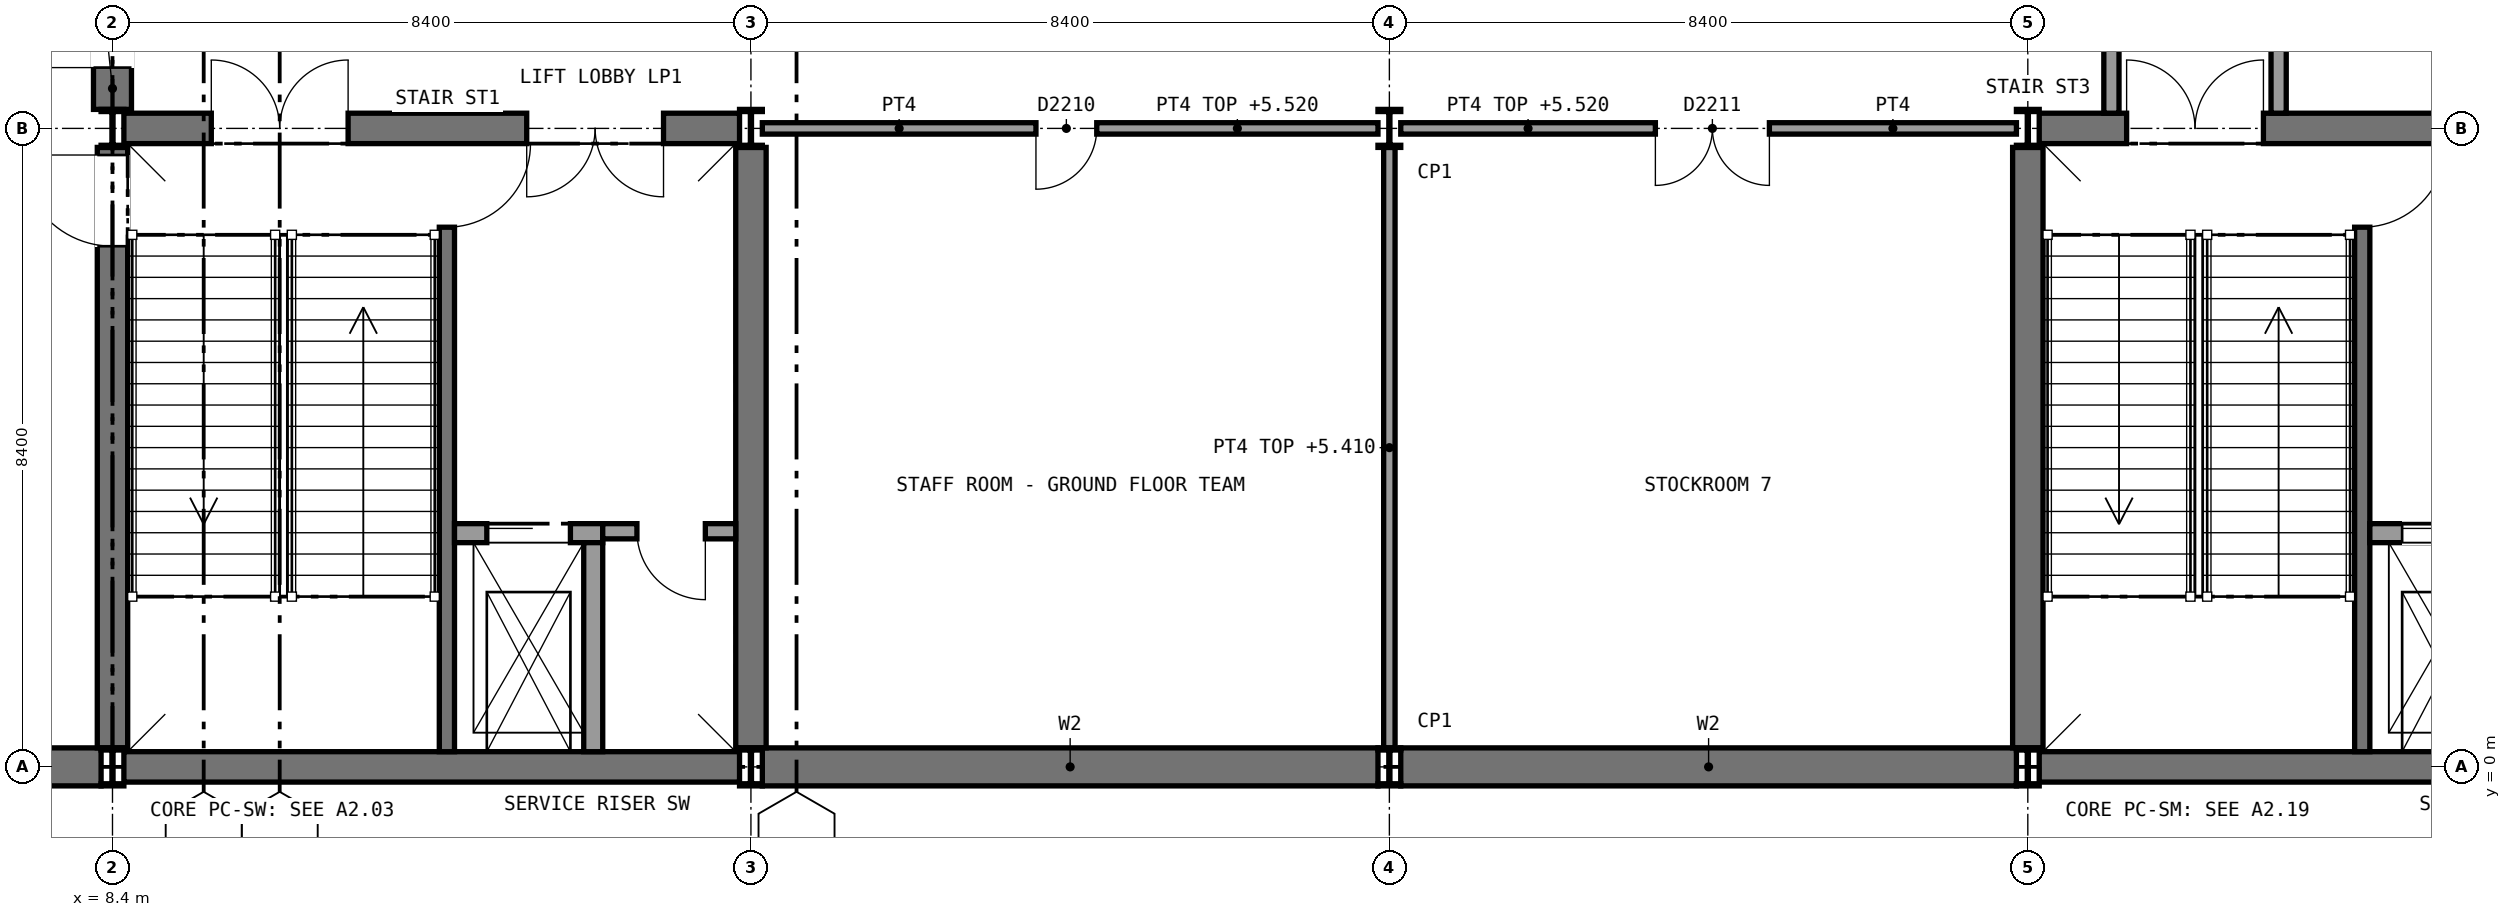
"""IFC4 building model, lengths in metres.
Left out: names, types, materials, properties, quantities, classifications, styles, units other than length and angle.
Written with IfcOpenShell. Run it as: python <this file> out.ifc"""

import sys

from ifc_helpers import new_model, si_unit, direction, frame, frame_2d, origin, origin_2d, place, context, subcontext, project, spatial, rectangle, i_section, extrude, element, fill, save


model = new_model("IFC4")
c1 = context("Model", 3, precision=1e-05, world=origin(), true_north=direction((0.0, 1.0)))
c2 = subcontext(c1, "Body", "Model", "MODEL_VIEW")
j1 = project(units=[si_unit("LENGTHUNIT", "METRE"), si_unit("PLANEANGLEUNIT", "RADIAN")], contexts=[c1])
p1 = place(None, origin())
s1 = spatial("IfcSite", under=j1, at=p1, CompositionType="ELEMENT")
p2 = place(p1, origin())
s2 = spatial("IfcBuilding", under=s1, at=p2, CompositionType="ELEMENT")
p3 = place(p2, origin())
s3 = spatial("IfcBuildingStorey", under=s2, at=p3, CompositionType="ELEMENT", Elevation=0.0)
p4 = place(p3, frame((0.305, 0.0, 0.0), z_axis=(0.0, 0.0, 1.0), x_axis=(1.0, 0.0, 0.0)))
e1 = element("IfcWall", 1, at=p4, inside=s3, PredefinedType="SHEAR", context=c2, shape_type="SweptSolid", body=[
    extrude(rectangle(XDim=7.945, YDim=0.5, at=frame_2d((3.973, 0.0))), origin(), (0.0, 0.0, 1.0), 6.0),
])
p5 = place(p3, frame((16.95, 0.0, 0.0), z_axis=(0.0, 0.0, 1.0), x_axis=(1.0, 0.0, 0.0)))
e2 = element("IfcWall", 2, at=p5, inside=s3, PredefinedType="SHEAR", context=c2, shape_type="SweptSolid", body=[
    extrude(rectangle(XDim=8.1, YDim=0.5, at=frame_2d((4.05, 0.0))), origin(), (0.0, 0.0, 1.0), 5.85),
])
p6 = place(p3, frame((25.35, 0.0, 0.0), z_axis=(0.0, 0.0, 1.0), x_axis=(1.0, 0.0, 0.0)))
e3 = element("IfcWall", 3, at=p6, inside=s3, PredefinedType="SHEAR", context=c2, shape_type="SweptSolid", body=[
    extrude(rectangle(XDim=8.1, YDim=0.5, at=frame_2d((4.05, 0.0))), origin(), (0.0, 0.0, 1.0), 5.85),
])
p7 = place(p3, frame((8.55, 0.0, 0.0), z_axis=(0.0, 0.0, 1.0), x_axis=(1.0, 0.0, 0.0)))
e4 = element("IfcWall", 4, at=p7, inside=s3, PredefinedType="SHEAR", context=c2, shape_type="SweptSolid", body=[
    extrude(rectangle(XDim=8.1, YDim=0.4, at=frame_2d((4.05, 0.0))), origin(), (0.0, 0.0, 1.0), 5.85),
])
p8 = place(p3, frame((8.55, 8.4, 0.0), z_axis=(0.0, 0.0, 1.0), x_axis=(1.0, 0.0, 0.0)))
e5 = element("IfcWall", 5, at=p8, inside=s3, PredefinedType="SHEAR", context=c2, shape_type="SweptSolid", body=[
    extrude(rectangle(XDim=8.1, YDim=0.4, at=frame_2d((4.05, 0.0))), origin(), (0.0, 0.0, 1.0), 5.85),
])
p9 = place(p8, frame((1.15, 0.0, 0.0)))
e6 = element("IfcOpeningElement", 6, at=p9, cuts=e5, PredefinedType="OPENING", context=c2, shape_type="SweptSolid", body=[
    extrude(rectangle(XDim=1.8, YDim=2.1, at=frame_2d((0.9, 1.05))), frame((0.0, 0.21, 0.0), z_axis=(0.0, -1.0, 0.0), x_axis=(1.0, 0.0, 0.0)), (0.0, 0.0, 1.0), 0.42),
])
p10 = place(p8, frame((5.3, 0.0, 0.0)))
e7 = element("IfcOpeningElement", 7, at=p10, cuts=e5, PredefinedType="OPENING", context=c2, shape_type="SweptSolid", body=[
    extrude(rectangle(XDim=1.8, YDim=2.1, at=frame_2d((0.9, 1.05))), frame((0.0, 0.21, 0.0), z_axis=(0.0, -1.0, 0.0), x_axis=(1.0, 0.0, 0.0)), (0.0, 0.0, 1.0), 0.42),
])
p11 = place(p3, frame((8.4, 0.25, 0.0), z_axis=(0.0, 0.0, 1.0), x_axis=(0.0, 1.0, 0.0)))
e8 = element("IfcWall", 8, at=p11, inside=s3, PredefinedType="SHEAR", context=c2, shape_type="SweptSolid", body=[
    extrude(rectangle(XDim=7.9, YDim=0.4, at=frame_2d((3.95, 0.0))), origin(), (0.0, 0.0, 1.0), 5.85),
])
p12 = place(p11, frame((6.6, 0.0, 0.0)))
e9 = element("IfcOpeningElement", 9, at=p12, cuts=e8, PredefinedType="OPENING", context=c2, shape_type="SweptSolid", body=[
    extrude(rectangle(XDim=1.2, YDim=2.1, at=frame_2d((0.6, 1.05))), frame((0.0, 0.21, 0.0), z_axis=(0.0, -1.0, 0.0), x_axis=(1.0, 0.0, 0.0)), (0.0, 0.0, 1.0), 0.42),
])
p13 = place(p3, frame((16.8, 0.25, 0.0), z_axis=(0.0, 0.0, 1.0), x_axis=(0.0, 1.0, 0.0)))
e10 = element("IfcWall", 10, at=p13, inside=s3, PredefinedType="SHEAR", context=c2, shape_type="SweptSolid", body=[
    extrude(rectangle(XDim=7.9, YDim=0.4, at=frame_2d((3.95, 0.0))), origin(), (0.0, 0.0, 1.0), 5.85),
])
p14 = place(p3, frame((33.75, 0.0, 0.0), z_axis=(0.0, 0.0, 1.0), x_axis=(1.0, 0.0, 0.0)))
e11 = element("IfcWall", 11, at=p14, inside=s3, PredefinedType="SHEAR", context=c2, shape_type="SweptSolid", body=[
    extrude(rectangle(XDim=8.1, YDim=0.4, at=frame_2d((4.05, 0.0))), origin(), (0.0, 0.0, 1.0), 5.85),
])
p15 = place(p3, frame((33.75, 8.4, 0.0), z_axis=(0.0, 0.0, 1.0), x_axis=(1.0, 0.0, 0.0)))
e12 = element("IfcWall", 12, at=p15, inside=s3, PredefinedType="SHEAR", context=c2, shape_type="SweptSolid", body=[
    extrude(rectangle(XDim=8.1, YDim=0.4, at=frame_2d((4.05, 0.0))), origin(), (0.0, 0.0, 1.0), 5.85),
])
p16 = place(p15, frame((5.3, 0.0, 0.0)))
e13 = element("IfcOpeningElement", 13, at=p16, cuts=e12, PredefinedType="OPENING", context=c2, shape_type="SweptSolid", body=[
    extrude(rectangle(XDim=1.8, YDim=2.1, at=frame_2d((0.9, 1.05))), frame((0.0, 0.21, 0.0), z_axis=(0.0, -1.0, 0.0), x_axis=(1.0, 0.0, 0.0)), (0.0, 0.0, 1.0), 0.42),
])
p17 = place(p15, frame((1.15, 0.0, 0.0)))
e14 = element("IfcOpeningElement", 14, at=p17, cuts=e12, PredefinedType="OPENING", context=c2, shape_type="SweptSolid", body=[
    extrude(rectangle(XDim=1.8, YDim=2.1, at=frame_2d((0.9, 1.05))), frame((0.0, 0.21, 0.0), z_axis=(0.0, -1.0, 0.0), x_axis=(1.0, 0.0, 0.0)), (0.0, 0.0, 1.0), 0.42),
])
p18 = place(p3, frame((33.6, 0.25, 0.0), z_axis=(0.0, 0.0, 1.0), x_axis=(0.0, 1.0, 0.0)))
e15 = element("IfcWall", 15, at=p18, inside=s3, PredefinedType="SHEAR", context=c2, shape_type="SweptSolid", body=[
    extrude(rectangle(XDim=7.9, YDim=0.4, at=frame_2d((3.95, 0.0))), origin(), (0.0, 0.0, 1.0), 5.85),
])
for number, where, z_axis, x_axis in (
    (16, (8.4, 0.0, 0.0), (0.0, 0.0, 1.0), (1.0, 0.0, 0.0)),
    (17, (8.4, 8.4, 0.0), (0.0, 0.0, 1.0), (1.0, 0.0, 0.0)),
    (18, (16.8, 0.0, 0.0), (0.0, 0.0, 1.0), (1.0, 0.0, 0.0)),
    (19, (16.8, 8.4, 0.0), (0.0, 0.0, 1.0), (1.0, 0.0, 0.0)),
    (20, (25.2, 0.0, 0.0), (0.0, 0.0, 1.0), (1.0, 0.0, 0.0)),
    (21, (25.2, 8.4, 0.0), (0.0, 0.0, 1.0), (1.0, 0.0, 0.0)),
    (22, (33.6, 0.0, 0.0), (0.0, 0.0, 1.0), (1.0, 0.0, 0.0)),
    (23, (33.6, 8.4, 0.0), (0.0, 0.0, 1.0), (1.0, 0.0, 0.0)),
):
    element("IfcColumn", number, at=place(p3, frame(where, z_axis=z_axis, x_axis=x_axis)), inside=s3, PredefinedType="COLUMN", context=c2, shape_type="SweptSolid", body=[
        extrude(i_section(OverallWidth=0.3, OverallDepth=0.5, WebThickness=0.014, FlangeThickness=0.028, FilletRadius=0.027, at=origin_2d()), origin(), (0.0, 0.0, 1.0), 6.0),
    ])
p19 = place(p3, frame((25.2, 0.25, 0.0), z_axis=(0.0, 0.0, 1.0), x_axis=(0.0, 1.0, 0.0)))
e24 = element("IfcWall", 24, at=p19, inside=s3, PredefinedType="SOLIDWALL", context=c2, shape_type="SweptSolid", body=[
    extrude(rectangle(XDim=7.9, YDim=0.15, at=frame_2d((3.95, 0.0))), origin(), (0.0, 0.0, 1.0), 5.41),
])
p20 = place(p3, frame((16.95, 8.4, 0.0), z_axis=(0.0, 0.0, 1.0), x_axis=(1.0, 0.0, 0.0)))
e25 = element("IfcWall", 25, at=p20, inside=s3, PredefinedType="SOLIDWALL", context=c2, shape_type="SweptSolid", body=[
    extrude(rectangle(XDim=8.1, YDim=0.15, at=frame_2d((4.05, 0.0))), origin(), (0.0, 0.0, 1.0), 5.52),
])
p21 = place(p20, frame((3.6, 0.0, 0.0)))
e26 = element("IfcOpeningElement", 26, at=p21, cuts=e25, PredefinedType="OPENING", context=c2, shape_type="SweptSolid", body=[
    extrude(rectangle(XDim=0.8, YDim=2.1, at=frame_2d((0.4, 1.05))), frame((0.0, 0.085, 0.0), z_axis=(0.0, -1.0, 0.0), x_axis=(1.0, 0.0, 0.0)), (0.0, 0.0, 1.0), 0.17),
])
p22 = place(p3, frame((25.35, 8.4, 0.0), z_axis=(0.0, 0.0, 1.0), x_axis=(1.0, 0.0, 0.0)))
e27 = element("IfcWall", 27, at=p22, inside=s3, PredefinedType="SOLIDWALL", context=c2, shape_type="SweptSolid", body=[
    extrude(rectangle(XDim=8.1, YDim=0.15, at=frame_2d((4.05, 0.0))), origin(), (0.0, 0.0, 1.0), 5.52),
])
p23 = place(p22, frame((3.35, 0.0, 0.0)))
e28 = element("IfcOpeningElement", 28, at=p23, cuts=e27, PredefinedType="OPENING", context=c2, shape_type="SweptSolid", body=[
    extrude(rectangle(XDim=1.5, YDim=2.1, at=frame_2d((0.75, 1.05))), frame((0.0, 0.085, 0.0), z_axis=(0.0, -1.0, 0.0), x_axis=(1.0, 0.0, 0.0)), (0.0, 0.0, 1.0), 0.17),
])
p24 = place(p3, frame((8.4, 8.65, 0.0), z_axis=(0.0, 0.0, 1.0), x_axis=(0.0, 1.0, 0.0)))
e29 = element("IfcWall", 29, at=p24, inside=s3, PredefinedType="STANDARD", context=c2, shape_type="SweptSolid", body=[
    extrude(rectangle(XDim=7.9, YDim=0.5, at=frame_2d((3.95, 0.0))), origin(), (0.0, 0.0, 1.0), 5.85),
])
p25 = place(p24, frame((0.55, 0.0, 0.0)))
e30 = element("IfcOpeningElement", 30, at=p25, cuts=e29, PredefinedType="OPENING", context=c2, shape_type="SweptSolid", body=[
    extrude(rectangle(XDim=2.6, YDim=3.0, at=frame_2d((1.3, 1.5))), frame((0.0, 0.26, 0.0), z_axis=(0.0, -1.0, 0.0), x_axis=(1.0, 0.0, 0.0)), (0.0, 0.0, 1.0), 0.52),
])
p26 = place(p24, frame((4.75, 0.0, 0.0)))
e31 = element("IfcOpeningElement", 31, at=p26, cuts=e29, PredefinedType="OPENING", context=c2, shape_type="SweptSolid", body=[
    extrude(rectangle(XDim=2.6, YDim=3.0, at=frame_2d((1.3, 1.5))), frame((0.0, 0.26, 0.0), z_axis=(0.0, -1.0, 0.0), x_axis=(1.0, 0.0, 0.0)), (0.0, 0.0, 1.0), 0.52),
])
p27 = place(p3, frame((12.8, 0.2, 0.0), z_axis=(0.0, 0.0, 1.0), x_axis=(0.0, 1.0, 0.0)))
e32 = element("IfcWall", 32, at=p27, inside=s3, PredefinedType="SHEAR", context=c2, shape_type="SweptSolid", body=[
    extrude(rectangle(XDim=8.0, YDim=0.2, at=frame_2d((4.0, 0.0))), origin(), (0.0, 0.0, 1.0), 5.85),
])
p28 = place(p27, frame((6.9, 0.0, 0.0)))
e33 = element("IfcOpeningElement", 33, at=p28, cuts=e32, PredefinedType="OPENING", context=c2, shape_type="SweptSolid", body=[
    extrude(rectangle(XDim=1.11, YDim=2.1, at=frame_2d((0.555, 1.05))), frame((0.0, 0.11, 0.0), z_axis=(0.0, -1.0, 0.0), x_axis=(1.0, 0.0, 0.0)), (0.0, 0.0, 1.0), 0.22),
])
p29 = place(p3, frame((12.9, 3.075, 0.0), z_axis=(0.0, 0.0, 1.0), x_axis=(1.0, 0.0, 0.0)))
e34 = element("IfcWall", 34, at=p29, inside=s3, PredefinedType="SOLIDWALL", context=c2, shape_type="SweptSolid", body=[
    extrude(rectangle(XDim=1.95, YDim=0.25, at=frame_2d((0.975, 0.0))), origin(), (0.0, 0.0, 1.0), 6.0),
])
p30 = place(p29, frame((0.425, 0.0, 0.0)))
e35 = element("IfcOpeningElement", 35, at=p30, cuts=e34, PredefinedType="OPENING", context=c2, shape_type="SweptSolid", body=[
    extrude(rectangle(XDim=1.1, YDim=2.1, at=frame_2d((0.55, 1.05))), frame((0.0, 0.135, 0.0), z_axis=(0.0, -1.0, 0.0), x_axis=(1.0, 0.0, 0.0)), (0.0, 0.0, 1.0), 0.27),
])
p31 = place(p3, frame((14.725, 0.2, 0.0), z_axis=(0.0, 0.0, 1.0), x_axis=(0.0, 1.0, 0.0)))
e36 = element("IfcWall", 36, at=p31, inside=s3, PredefinedType="SOLIDWALL", context=c2, shape_type="SweptSolid", body=[
    extrude(rectangle(XDim=2.75, YDim=0.25, at=frame_2d((1.375, 0.0))), origin(), (0.0, 0.0, 1.0), 6.0),
])
p32 = place(p3, frame((14.85, 3.1, 0.0), z_axis=(0.0, 0.0, 1.0), x_axis=(1.0, 0.0, 0.0)))
e37 = element("IfcWall", 37, at=p32, inside=s3, PredefinedType="PARTITIONING", context=c2, shape_type="SweptSolid", body=[
    extrude(rectangle(XDim=1.75, YDim=0.2, at=frame_2d((0.875, 0.0))), origin(), (0.0, 0.0, 1.0), 5.85),
])
p33 = place(p32, frame((0.45, 0.0, 0.0)))
e38 = element("IfcOpeningElement", 38, at=p33, cuts=e37, PredefinedType="OPENING", context=c2, shape_type="SweptSolid", body=[
    extrude(rectangle(XDim=0.9, YDim=2.1, at=frame_2d((0.45, 1.05))), frame((0.0, 0.11, 0.0), z_axis=(0.0, -1.0, 0.0), x_axis=(1.0, 0.0, 0.0)), (0.0, 0.0, 1.0), 0.22),
])
p34 = place(p3, frame((38.0, 0.2, 0.0), z_axis=(0.0, 0.0, 1.0), x_axis=(0.0, 1.0, 0.0)))
e39 = element("IfcWall", 39, at=p34, inside=s3, PredefinedType="SHEAR", context=c2, shape_type="SweptSolid", body=[
    extrude(rectangle(XDim=8.0, YDim=0.2, at=frame_2d((4.0, 0.0))), origin(), (0.0, 0.0, 1.0), 5.85),
])
p35 = place(p34, frame((6.9, 0.0, 0.0)))
e40 = element("IfcOpeningElement", 40, at=p35, cuts=e39, PredefinedType="OPENING", context=c2, shape_type="SweptSolid", body=[
    extrude(rectangle(XDim=1.11, YDim=2.1, at=frame_2d((0.555, 1.05))), frame((0.0, 0.11, 0.0), z_axis=(0.0, -1.0, 0.0), x_axis=(1.0, 0.0, 0.0)), (0.0, 0.0, 1.0), 0.22),
])
p36 = place(p3, frame((38.1, 3.075, 0.0), z_axis=(0.0, 0.0, 1.0), x_axis=(1.0, 0.0, 0.0)))
e41 = element("IfcWall", 41, at=p36, inside=s3, PredefinedType="SOLIDWALL", context=c2, shape_type="SweptSolid", body=[
    extrude(rectangle(XDim=1.95, YDim=0.25, at=frame_2d((0.975, 0.0))), origin(), (0.0, 0.0, 1.0), 6.0),
])
p37 = place(p36, frame((0.425, 0.0, 0.0)))
e42 = element("IfcOpeningElement", 42, at=p37, cuts=e41, PredefinedType="OPENING", context=c2, shape_type="SweptSolid", body=[
    extrude(rectangle(XDim=1.1, YDim=2.1, at=frame_2d((0.55, 1.05))), frame((0.0, 0.135, 0.0), z_axis=(0.0, -1.0, 0.0), x_axis=(1.0, 0.0, 0.0)), (0.0, 0.0, 1.0), 0.27),
])
for number, where, z_axis, x_axis in (
    (43, (34.7, 8.6, 0.0), (0.0, 0.0, 1.0), (0.0, 1.0, 0.0)),
    (44, (36.9, 8.6, 0.0), (0.0, 0.0, 1.0), (0.0, 1.0, 0.0)),
):
    element("IfcWall", number, at=place(p3, frame(where, z_axis=z_axis, x_axis=x_axis)), inside=s3, PredefinedType="PARTITIONING", context=c2, shape_type="SweptSolid", body=[
        extrude(rectangle(XDim=16.4, YDim=0.2, at=frame_2d((8.2, 0.0))), origin(), (0.0, 0.0, 1.0), 5.85),
    ])
p38 = place(p21, frame((0.8, 0.0, 0.0), z_axis=(0.0, 0.0, 1.0), x_axis=(-1.0, 0.0, 0.0)))
e45 = element("IfcDoor", 45, at=p38, inside=s3, OperationType="SINGLE_SWING_RIGHT", PredefinedType="DOOR", context=c2, shape_type="SweptSolid", body=[
    extrude(rectangle(XDim=0.8, YDim=2.1, at=frame_2d((0.4, 1.05))), frame((0.0, 0.025, 0.0), z_axis=(0.0, -1.0, 0.0), x_axis=(1.0, 0.0, 0.0)), (0.0, 0.0, 1.0), 0.05),
])
fill(e26, e45)
p39 = place(p23, frame((1.5, 0.0, 0.0), z_axis=(0.0, 0.0, 1.0), x_axis=(-1.0, 0.0, 0.0)))
e46 = element("IfcDoor", 46, at=p39, inside=s3, OperationType="DOUBLE_DOOR_SINGLE_SWING", PredefinedType="DOOR", context=c2, shape_type="SweptSolid", body=[
    extrude(rectangle(XDim=1.5, YDim=2.1, at=frame_2d((0.75, 1.05))), frame((0.0, 0.025, 0.0), z_axis=(0.0, -1.0, 0.0), x_axis=(1.0, 0.0, 0.0)), (0.0, 0.0, 1.0), 0.05),
])
fill(e28, e46)
p40 = place(p25, origin())
e47 = element("IfcDoor", 47, at=p40, inside=s3, OperationType="DOUBLE_DOOR_SINGLE_SWING", PredefinedType="DOOR", context=c2, shape_type="SweptSolid", body=[
    extrude(rectangle(XDim=2.6, YDim=3.0, at=frame_2d((1.3, 1.5))), frame((0.0, 0.025, 0.0), z_axis=(0.0, -1.0, 0.0), x_axis=(1.0, 0.0, 0.0)), (0.0, 0.0, 1.0), 0.05),
])
fill(e30, e47)
p41 = place(p28, frame((1.1, 0.0, 0.0), z_axis=(0.0, 0.0, 1.0), x_axis=(-1.0, 0.0, 0.0)))
e48 = element("IfcDoor", 48, at=p41, inside=s3, OperationType="SINGLE_SWING_LEFT", PredefinedType="DOOR", context=c2, shape_type="SweptSolid", body=[
    extrude(rectangle(XDim=1.1, YDim=2.1, at=frame_2d((0.55, 1.05))), frame((0.0, 0.025, 0.0), z_axis=(0.0, -1.0, 0.0), x_axis=(1.0, 0.0, 0.0)), (0.0, 0.0, 1.0), 0.05),
])
fill(e33, e48)
p42 = place(p30, origin())
e49 = element("IfcDoor", 49, at=p42, inside=s3, OperationType="SLIDING_TO_LEFT", PredefinedType="DOOR", context=c2, shape_type="SweptSolid", body=[
    extrude(rectangle(XDim=1.1, YDim=2.1, at=frame_2d((0.55, 1.05))), frame((0.0, 0.025, 0.0), z_axis=(0.0, -1.0, 0.0), x_axis=(1.0, 0.0, 0.0)), (0.0, 0.0, 1.0), 0.05),
])
fill(e35, e49)
p43 = place(p33, frame((0.9, 0.0, 0.0), z_axis=(0.0, 0.0, 1.0), x_axis=(-1.0, 0.0, 0.0)))
e50 = element("IfcDoor", 50, at=p43, inside=s3, OperationType="SINGLE_SWING_LEFT", PredefinedType="DOOR", context=c2, shape_type="SweptSolid", body=[
    extrude(rectangle(XDim=0.9, YDim=2.1, at=frame_2d((0.45, 1.05))), frame((0.0, 0.025, 0.0), z_axis=(0.0, -1.0, 0.0), x_axis=(1.0, 0.0, 0.0)), (0.0, 0.0, 1.0), 0.05),
])
fill(e38, e50)
p44 = place(p9, origin())
e51 = element("IfcDoor", 51, at=p44, inside=s3, OperationType="DOUBLE_DOOR_SINGLE_SWING", PredefinedType="DOOR", context=c2, shape_type="SweptSolid", body=[
    extrude(rectangle(XDim=1.8, YDim=2.1, at=frame_2d((0.9, 1.05))), frame((0.0, 0.025, 0.0), z_axis=(0.0, -1.0, 0.0), x_axis=(1.0, 0.0, 0.0)), (0.0, 0.0, 1.0), 0.05),
])
fill(e6, e51)
p45 = place(p10, frame((1.8, 0.0, 0.0), z_axis=(0.0, 0.0, 1.0), x_axis=(-1.0, 0.0, 0.0)))
e52 = element("IfcDoor", 52, at=p45, inside=s3, OperationType="DOUBLE_DOOR_SINGLE_SWING", PredefinedType="DOOR", context=c2, shape_type="SweptSolid", body=[
    extrude(rectangle(XDim=1.8, YDim=2.1, at=frame_2d((0.9, 1.05))), frame((0.0, 0.025, 0.0), z_axis=(0.0, -1.0, 0.0), x_axis=(1.0, 0.0, 0.0)), (0.0, 0.0, 1.0), 0.05),
])
fill(e7, e52)
p46 = place(p35, frame((1.1, 0.0, 0.0), z_axis=(0.0, 0.0, 1.0), x_axis=(-1.0, 0.0, 0.0)))
e53 = element("IfcDoor", 53, at=p46, inside=s3, OperationType="SINGLE_SWING_LEFT", PredefinedType="DOOR", context=c2, shape_type="SweptSolid", body=[
    extrude(rectangle(XDim=1.1, YDim=2.1, at=frame_2d((0.55, 1.05))), frame((0.0, 0.025, 0.0), z_axis=(0.0, -1.0, 0.0), x_axis=(1.0, 0.0, 0.0)), (0.0, 0.0, 1.0), 0.05),
])
fill(e40, e53)
p47 = place(p37, origin())
e54 = element("IfcDoor", 54, at=p47, inside=s3, OperationType="SLIDING_TO_LEFT", PredefinedType="DOOR", context=c2, shape_type="SweptSolid", body=[
    extrude(rectangle(XDim=1.1, YDim=2.1, at=frame_2d((0.55, 1.05))), frame((0.0, 0.025, 0.0), z_axis=(0.0, -1.0, 0.0), x_axis=(1.0, 0.0, 0.0)), (0.0, 0.0, 1.0), 0.05),
])
fill(e42, e54)
p48 = place(p12, origin())
e55 = element("IfcDoor", 55, at=p48, inside=s3, OperationType="SINGLE_SWING_RIGHT", PredefinedType="DOOR", context=c2, shape_type="SweptSolid", body=[
    extrude(rectangle(XDim=1.2, YDim=2.1, at=frame_2d((0.6, 1.05))), frame((0.0, 0.025, 0.0), z_axis=(0.0, -1.0, 0.0), x_axis=(1.0, 0.0, 0.0)), (0.0, 0.0, 1.0), 0.05),
])
fill(e9, e55)
p49 = place(p17, origin())
e56 = element("IfcDoor", 56, at=p49, inside=s3, OperationType="DOUBLE_DOOR_SINGLE_SWING", PredefinedType="DOOR", context=c2, shape_type="SweptSolid", body=[
    extrude(rectangle(XDim=1.8, YDim=2.1, at=frame_2d((0.9, 1.05))), frame((0.0, 0.025, 0.0), z_axis=(0.0, -1.0, 0.0), x_axis=(1.0, 0.0, 0.0)), (0.0, 0.0, 1.0), 0.05),
])
fill(e14, e56)
save(model, sys.argv[1])
